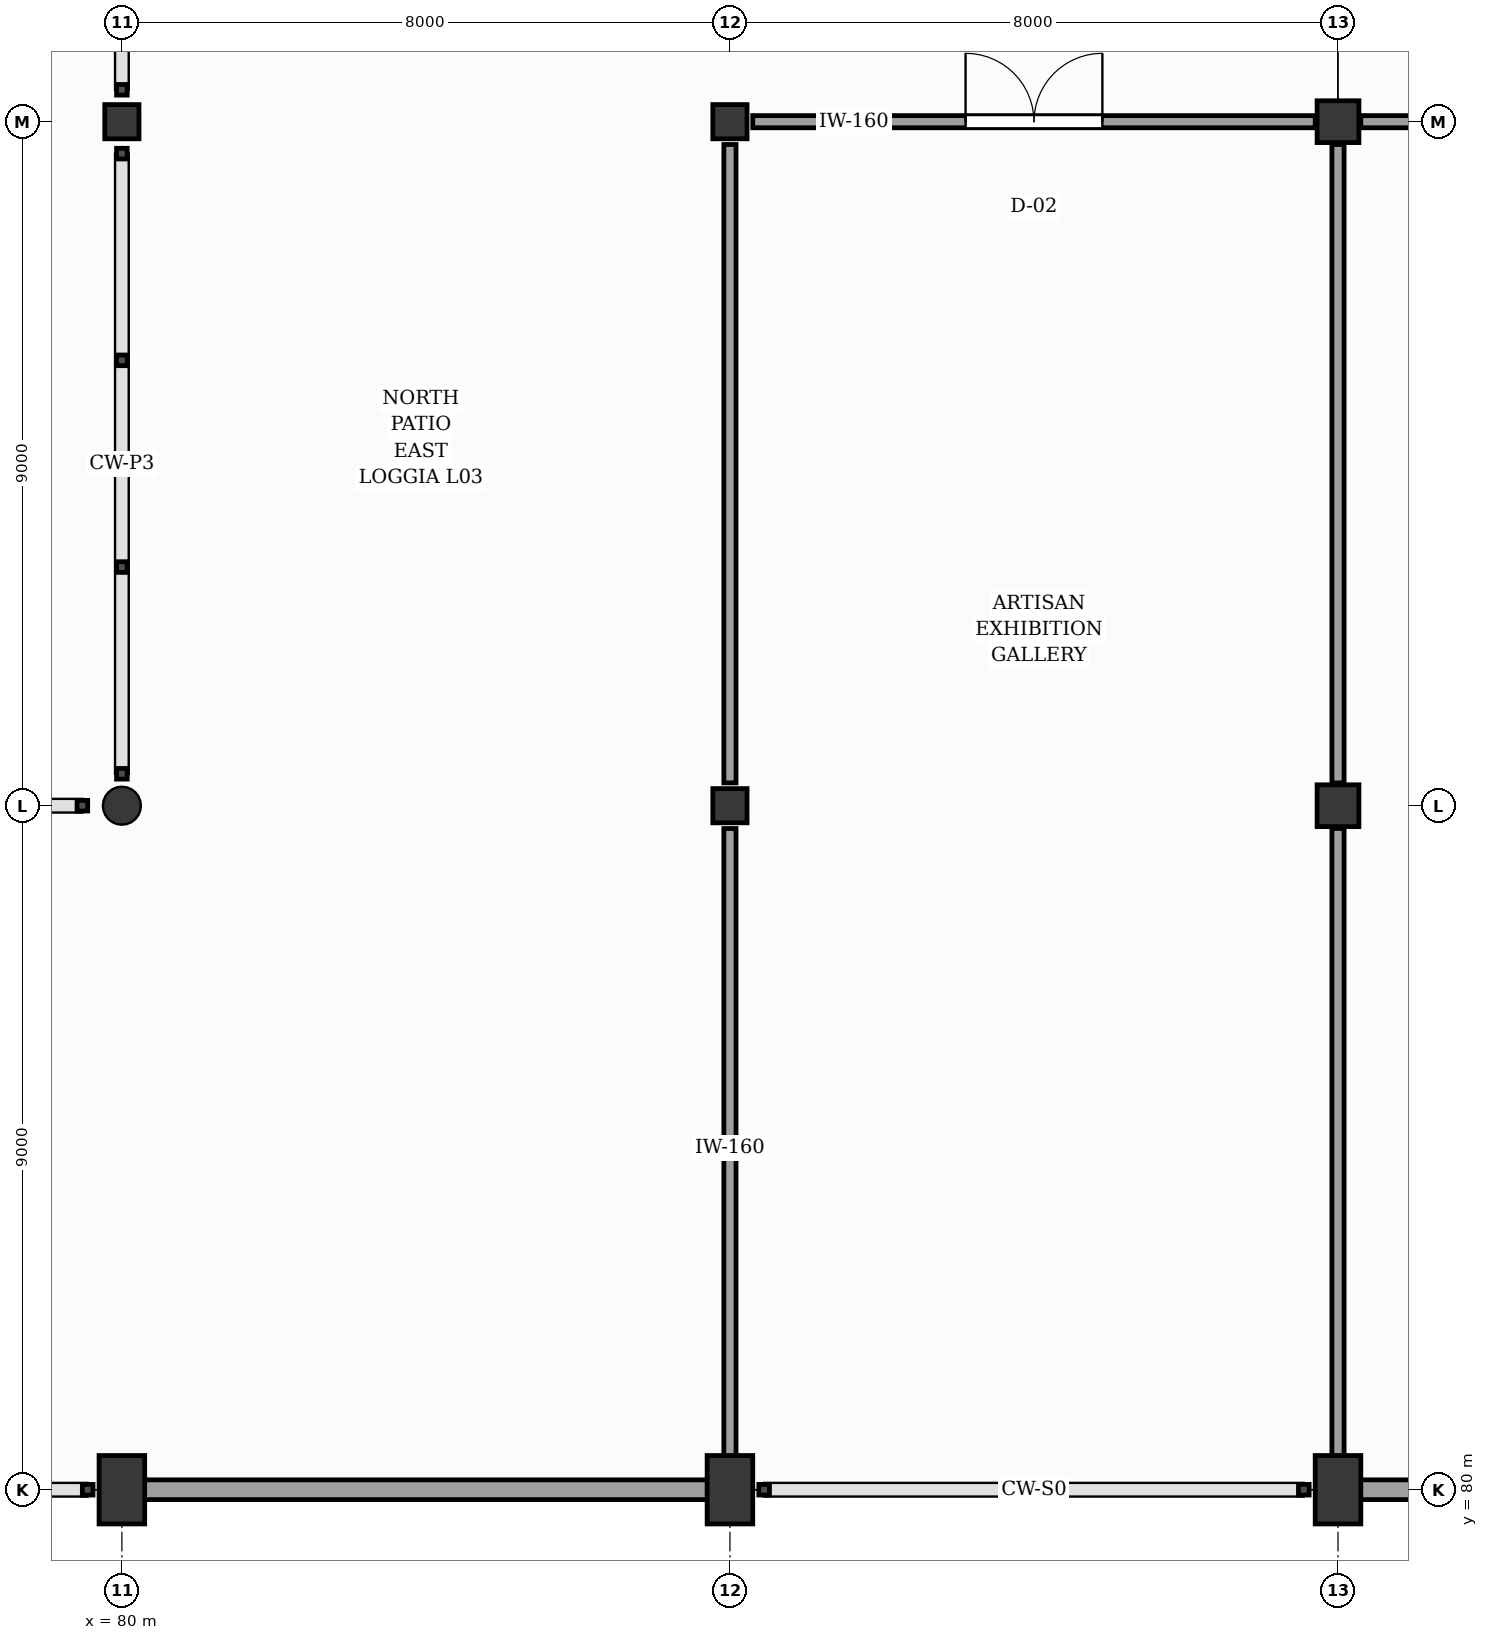
"""IFC4 building model, lengths in metres.
Left out: names, types, materials, properties, quantities, classifications, styles, units other than length and angle.
Written with IfcOpenShell. Run it as: python <this file> out.ifc"""

import sys

from ifc_helpers import new_model, si_unit, direction, frame, frame_2d, origin, origin_2d, place, context, subcontext, project, spatial, rectangle, circle, extrude, element, fill, save


model = new_model("IFC4")
c1 = context("Model", 3, precision=1e-05, world=origin(), true_north=direction((0.0, 1.0)))
c2 = subcontext(c1, "Body", "Model", "MODEL_VIEW")
j1 = project(units=[si_unit("LENGTHUNIT", "METRE"), si_unit("PLANEANGLEUNIT", "RADIAN")], contexts=[c1])
p1 = place(None, origin())
s1 = spatial("IfcSite", under=j1, at=p1, CompositionType="ELEMENT")
p2 = place(p1, origin())
s2 = spatial("IfcBuilding", under=s1, at=p2, CompositionType="ELEMENT")
p3 = place(p2, frame((0.0, 0.0, 16.2)))
s3 = spatial("IfcBuildingStorey", under=s2, at=p3, CompositionType="ELEMENT", Elevation=16.2)
p4 = place(p3, frame((80.0, 80.0, 0.0), z_axis=(0.0, 0.0, 1.0), x_axis=(1.0, 0.0, 0.0)))
e1 = element("IfcColumn", 1, at=p4, inside=s3, PredefinedType="COLUMN", context=c2, shape_type="SweptSolid", body=[
    extrude(rectangle(XDim=0.6, YDim=0.9, at=origin_2d()), origin(), (0.0, 0.0, 1.0), 4.2),
])
p5 = place(p3, frame((80.0, 89.0, 0.0), z_axis=(0.0, 0.0, 1.0), x_axis=(1.0, 0.0, 0.0)))
e2 = element("IfcColumn", 2, at=p5, inside=s3, PredefinedType="COLUMN", context=c2, shape_type="SweptSolid", body=[
    extrude(circle(Radius=0.25, at=origin_2d()), origin(), (0.0, 0.0, 1.0), 4.2),
])
p6 = place(p3, frame((80.0, 98.0, 0.0), z_axis=(0.0, 0.0, 1.0), x_axis=(1.0, 0.0, 0.0)))
e3 = element("IfcColumn", 3, at=p6, inside=s3, PredefinedType="COLUMN", context=c2, shape_type="SweptSolid", body=[
    extrude(rectangle(XDim=0.45, YDim=0.45, at=origin_2d()), origin(), (0.0, 0.0, 1.0), 4.2),
])
p7 = place(p3, frame((88.0, 80.0, 0.0), z_axis=(0.0, 0.0, 1.0), x_axis=(1.0, 0.0, 0.0)))
e4 = element("IfcColumn", 4, at=p7, inside=s3, PredefinedType="COLUMN", context=c2, shape_type="SweptSolid", body=[
    extrude(rectangle(XDim=0.6, YDim=0.9, at=origin_2d()), origin(), (0.0, 0.0, 1.0), 4.2),
])
for number, where, z_axis, x_axis in (
    (5, (88.0, 89.0, 0.0), (0.0, 0.0, 1.0), (1.0, 0.0, 0.0)),
    (6, (88.0, 98.0, 0.0), (0.0, 0.0, 1.0), (1.0, 0.0, 0.0)),
):
    element("IfcColumn", number, at=place(p3, frame(where, z_axis=z_axis, x_axis=x_axis)), inside=s3, PredefinedType="COLUMN", context=c2, shape_type="SweptSolid", body=[
        extrude(rectangle(XDim=0.45, YDim=0.45, at=origin_2d()), origin(), (0.0, 0.0, 1.0), 4.2),
    ])
p8 = place(p3, frame((96.0, 80.0, 0.0), z_axis=(0.0, 0.0, 1.0), x_axis=(1.0, 0.0, 0.0)))
e7 = element("IfcColumn", 7, at=p8, inside=s3, PredefinedType="COLUMN", context=c2, shape_type="SweptSolid", body=[
    extrude(rectangle(XDim=0.6, YDim=0.9, at=origin_2d()), origin(), (0.0, 0.0, 1.0), 4.2),
])
for number, where, z_axis, x_axis in (
    (8, (96.0, 89.0, 0.0), (0.0, 0.0, 1.0), (1.0, 0.0, 0.0)),
    (9, (96.0, 98.0, 0.0), (0.0, 0.0, 1.0), (1.0, 0.0, 0.0)),
):
    element("IfcColumn", number, at=place(p3, frame(where, z_axis=z_axis, x_axis=x_axis)), inside=s3, PredefinedType="COLUMN", context=c2, shape_type="SweptSolid", body=[
        extrude(rectangle(XDim=0.55, YDim=0.55, at=origin_2d()), origin(), (0.0, 0.0, 1.0), 4.2),
    ])
for number, where, z_axis, x_axis in (
    (10, (80.295, 80.0, 0.0), (0.0, 0.0, 1.0), (1.0, 0.0, 0.0)),
    (11, (96.295, 80.0, 0.0), (0.0, 0.0, 1.0), (1.0, 0.0, 0.0)),
):
    element("IfcWall", number, at=place(p3, frame(where, z_axis=z_axis, x_axis=x_axis)), inside=s3, PredefinedType="SOLIDWALL", context=c2, shape_type="SweptSolid", body=[
        extrude(rectangle(XDim=7.41, YDim=0.26, at=frame_2d((3.705, 0.0))), origin(), (0.0, 0.0, 1.0), 2.91),
    ])
p9 = place(p3, frame((88.3, 98.0, 0.0), z_axis=(0.0, 0.0, 1.0), x_axis=(1.0, 0.0, 0.0)))
e12 = element("IfcWall", 12, at=p9, inside=s3, PredefinedType="PARTITIONING", context=c2, shape_type="SweptSolid", body=[
    extrude(rectangle(XDim=7.4, YDim=0.16, at=frame_2d((3.7, 0.0))), origin(), (0.0, 0.0, 1.0), 3.1),
])
p10 = place(p9, frame((2.8, 0.0, 0.0)))
e13 = element("IfcOpeningElement", 13, at=p10, cuts=e12, PredefinedType="OPENING", context=c2, shape_type="SweptSolid", body=[
    extrude(rectangle(XDim=1.8, YDim=2.25, at=frame_2d((0.9, 1.125))), frame((0.0, 0.09, 0.0), z_axis=(0.0, -1.0, 0.0), x_axis=(1.0, 0.0, 0.0)), (0.0, 0.0, 1.0), 0.18),
])
p11 = place(p3, frame((88.0, 80.3, 0.0), z_axis=(0.0, 0.0, 1.0), x_axis=(0.0, 1.0, 0.0)))
e14 = element("IfcWall", 14, at=p11, inside=s3, PredefinedType="PARTITIONING", context=c2, shape_type="SweptSolid", body=[
    extrude(rectangle(XDim=8.4, YDim=0.16, at=frame_2d((4.2, 0.0))), origin(), (0.0, 0.0, 1.0), 2.91),
])
p12 = place(p3, frame((88.0, 89.3, 0.0), z_axis=(0.0, 0.0, 1.0), x_axis=(0.0, 1.0, 0.0)))
e15 = element("IfcWall", 15, at=p12, inside=s3, PredefinedType="PARTITIONING", context=c2, shape_type="SweptSolid", body=[
    extrude(rectangle(XDim=8.4, YDim=0.16, at=frame_2d((4.2, 0.0))), origin(), (0.0, 0.0, 1.0), 3.1),
])
p13 = place(p3, frame((96.0, 80.3, 0.0), z_axis=(0.0, 0.0, 1.0), x_axis=(0.0, 1.0, 0.0)))
e16 = element("IfcWall", 16, at=p13, inside=s3, PredefinedType="PARTITIONING", context=c2, shape_type="SweptSolid", body=[
    extrude(rectangle(XDim=8.4, YDim=0.16, at=frame_2d((4.2, 0.0))), origin(), (0.0, 0.0, 1.0), 2.91),
])
p14 = place(p3, frame((96.0, 89.3, 0.0), z_axis=(0.0, 0.0, 1.0), x_axis=(0.0, 1.0, 0.0)))
e17 = element("IfcWall", 17, at=p14, inside=s3, PredefinedType="PARTITIONING", context=c2, shape_type="SweptSolid", body=[
    extrude(rectangle(XDim=8.4, YDim=0.16, at=frame_2d((4.2, 0.0))), origin(), (0.0, 0.0, 1.0), 3.1),
])
p15 = place(p3, frame((96.3, 98.0, 0.0), z_axis=(0.0, 0.0, 1.0), x_axis=(1.0, 0.0, 0.0)))
e18 = element("IfcWall", 18, at=p15, inside=s3, PredefinedType="PARTITIONING", context=c2, shape_type="SweptSolid", body=[
    extrude(rectangle(XDim=7.4, YDim=0.16, at=frame_2d((3.7, 0.0))), origin(), (0.0, 0.0, 1.0), 3.1),
])
p16 = place(p15, frame((2.8, 0.0, 0.0)))
e19 = element("IfcOpeningElement", 19, at=p16, cuts=e18, PredefinedType="OPENING", context=c2, shape_type="SweptSolid", body=[
    extrude(rectangle(XDim=1.8, YDim=2.25, at=frame_2d((0.9, 1.125))), frame((0.0, 0.09, 0.0), z_axis=(0.0, -1.0, 0.0), x_axis=(1.0, 0.0, 0.0)), (0.0, 0.0, 1.0), 0.18),
])
p17 = place(p10, origin())
e20 = element("IfcDoor", 20, at=p17, inside=s3, OperationType="DOUBLE_DOOR_SINGLE_SWING", PredefinedType="DOOR", context=c2, shape_type="SweptSolid", body=[
    extrude(rectangle(XDim=1.8, YDim=2.25, at=frame_2d((0.9, 1.125))), frame((0.0, 0.025, 0.0), z_axis=(0.0, -1.0, 0.0), x_axis=(1.0, 0.0, 0.0)), (0.0, 0.0, 1.0), 0.05),
])
fill(e13, e20)
save(model, sys.argv[1])
